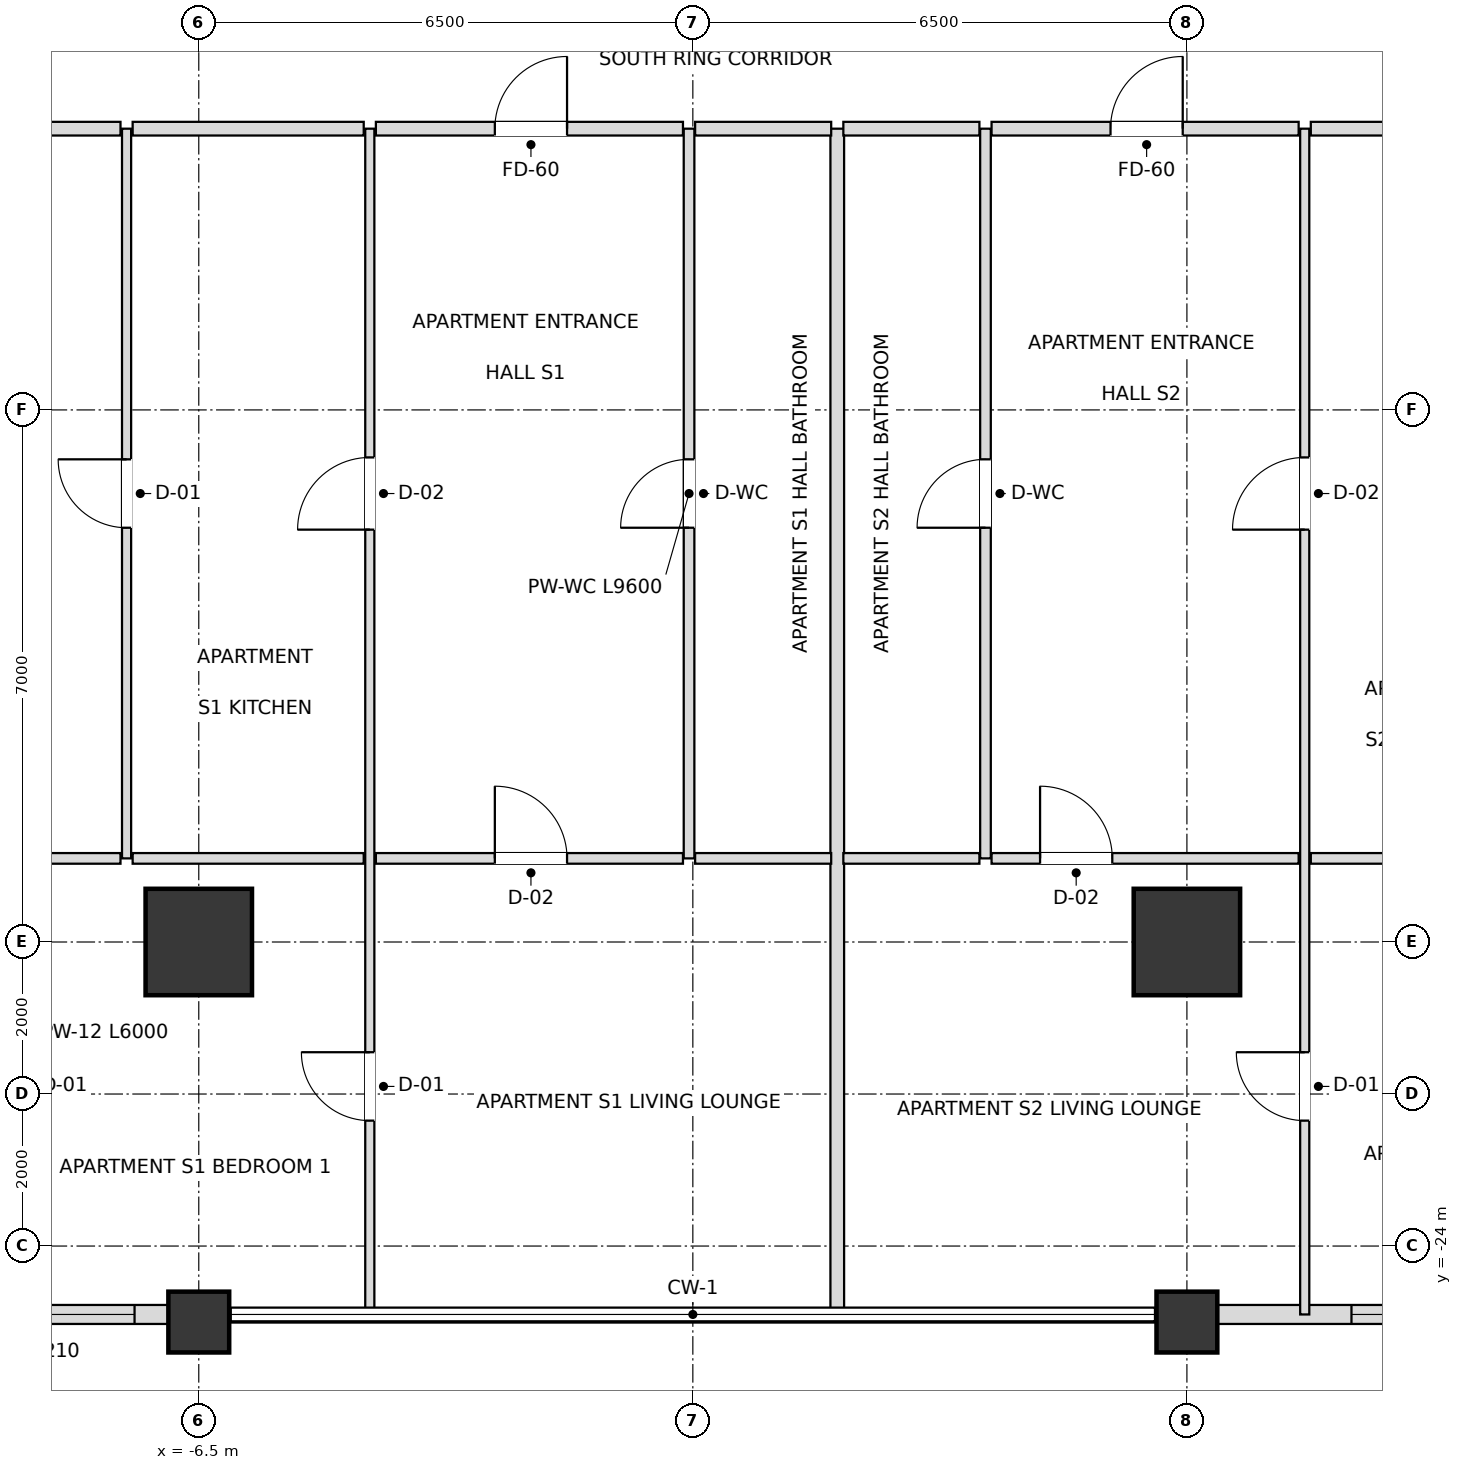
"""IFC4 building model, lengths in metres.
Left out: names, types, materials, properties, quantities, classifications, styles, units other than length and angle.
Written with IfcOpenShell. Run it as: python <this file> out.ifc"""

import sys

from ifc_helpers import new_model, si_unit, direction, frame, frame_2d, origin, origin_2d, place, context, subcontext, project, spatial, rectangle, extrude, element, fill, save


model = new_model("IFC4")
c1 = context("Model", 3, precision=1e-05, world=origin(), true_north=direction((0.0, 1.0)))
c2 = subcontext(c1, "Body", "Model", "MODEL_VIEW")
j1 = project(units=[si_unit("LENGTHUNIT", "METRE"), si_unit("PLANEANGLEUNIT", "RADIAN")], contexts=[c1])
p1 = place(None, origin())
s1 = spatial("IfcSite", under=j1, at=p1, CompositionType="ELEMENT")
p2 = place(p1, origin())
s2 = spatial("IfcBuilding", under=s1, at=p2, CompositionType="ELEMENT")
p3 = place(p2, frame((0.0, 0.0, 54.0)))
s3 = spatial("IfcBuildingStorey", under=s2, at=p3, CompositionType="ELEMENT", Elevation=54.0)
for number, where, z_axis, x_axis in (
    (1, (-6.5, -20.0, 0.0), (0.0, 0.0, 1.0), (1.0, 0.0, 0.0)),
    (2, (6.5, -20.0, 0.0), (0.0, 0.0, 1.0), (1.0, 0.0, 0.0)),
):
    element("IfcColumn", number, at=place(p3, frame(where, z_axis=z_axis, x_axis=x_axis)), inside=s3, PredefinedType="USERDEFINED", context=c2, shape_type="SweptSolid", body=[
        extrude(rectangle(XDim=1.4, YDim=1.4, at=origin_2d()), origin(), (0.0, 0.0, 1.0), 3.6),
    ])
for number, where, z_axis, x_axis in (
    (3, (-6.5, -25.0, 0.0), (0.0, 0.0, 1.0), (1.0, 0.0, 0.0)),
    (4, (6.5, -25.0, 0.0), (0.0, 0.0, 1.0), (1.0, 0.0, 0.0)),
):
    element("IfcColumn", number, at=place(p3, frame(where, z_axis=z_axis, x_axis=x_axis)), inside=s3, PredefinedType="COLUMN", context=c2, shape_type="SweptSolid", body=[
        extrude(rectangle(XDim=0.8, YDim=0.8, at=origin_2d()), origin(), (0.0, 0.0, 1.0), 3.6),
    ])
p4 = place(p3, frame((-11.105, -24.9, 0.0), z_axis=(0.0, 0.0, 1.0), x_axis=(1.0, 0.0, 0.0)))
e5 = element("IfcWall", 5, at=p4, inside=s3, PredefinedType="SOLIDWALL", context=c2, shape_type="SweptSolid", body=[
    extrude(rectangle(XDim=4.21, YDim=0.25, at=frame_2d((2.105, 0.0))), origin(), (0.0, 0.0, 1.0), 2.736),
])
p5 = place(p4, frame((0.5, 0.0, 0.72)))
e6 = element("IfcOpeningElement", 6, at=p5, cuts=e5, PredefinedType="OPENING", context=c2, shape_type="SweptSolid", body=[
    extrude(rectangle(XDim=1.2, YDim=1.68, at=frame_2d((0.6, 0.84))), frame((0.0, 0.135, 0.0), z_axis=(0.0, -1.0, 0.0), x_axis=(1.0, 0.0, 0.0)), (0.0, 0.0, 1.0), 0.27),
])
p6 = place(p4, frame((2.56, 0.0, 0.72)))
e7 = element("IfcOpeningElement", 7, at=p6, cuts=e5, PredefinedType="OPENING", context=c2, shape_type="SweptSolid", body=[
    extrude(rectangle(XDim=1.2, YDim=1.68, at=frame_2d((0.6, 0.84))), frame((0.0, 0.135, 0.0), z_axis=(0.0, -1.0, 0.0), x_axis=(1.0, 0.0, 0.0)), (0.0, 0.0, 1.0), 0.27),
])
p7 = place(p3, frame((6.895, -24.9, 0.0), z_axis=(0.0, 0.0, 1.0), x_axis=(1.0, 0.0, 0.0)))
e8 = element("IfcWall", 8, at=p7, inside=s3, PredefinedType="SOLIDWALL", context=c2, shape_type="SweptSolid", body=[
    extrude(rectangle(XDim=4.21, YDim=0.25, at=frame_2d((2.105, 0.0))), origin(), (0.0, 0.0, 1.0), 2.736),
])
p8 = place(p7, frame((1.77, 0.0, 0.72)))
e9 = element("IfcOpeningElement", 9, at=p8, cuts=e8, PredefinedType="OPENING", context=c2, shape_type="SweptSolid", body=[
    extrude(rectangle(XDim=1.8, YDim=1.68, at=frame_2d((0.9, 0.84))), frame((0.0, 0.135, 0.0), z_axis=(0.0, -1.0, 0.0), x_axis=(1.0, 0.0, 0.0)), (0.0, 0.0, 1.0), 0.27),
])
p9 = place(p3, frame((-7.45, -18.9, 0.0), z_axis=(0.0, 0.0, 1.0), x_axis=(0.0, 1.0, 0.0)))
e10 = element("IfcWall", 10, at=p9, inside=s3, PredefinedType="PARTITIONING", context=c2, shape_type="SweptSolid", body=[
    extrude(rectangle(XDim=9.6, YDim=0.12, at=frame_2d((4.8, 0.0))), origin(), (0.0, 0.0, 1.0), 2.816),
])
p10 = place(p9, frame((4.35, 0.0, 0.0)))
e11 = element("IfcOpeningElement", 11, at=p10, cuts=e10, PredefinedType="OPENING", context=c2, shape_type="SweptSolid", body=[
    extrude(rectangle(XDim=0.9, YDim=2.1, at=frame_2d((0.45, 1.05))), frame((0.0, 0.07, 0.0), z_axis=(0.0, -1.0, 0.0), x_axis=(1.0, 0.0, 0.0)), (0.0, 0.0, 1.0), 0.14),
])
p11 = place(p3, frame((-4.25, -24.9, 0.0), z_axis=(0.0, 0.0, 1.0), x_axis=(0.0, 1.0, 0.0)))
e12 = element("IfcWall", 12, at=p11, inside=s3, PredefinedType="PARTITIONING", context=c2, shape_type="SweptSolid", body=[
    extrude(rectangle(XDim=15.6, YDim=0.12, at=frame_2d((7.8, 0.0))), origin(), (0.0, 0.0, 1.0), 2.816),
])
p12 = place(p11, frame((10.325, 0.0, 0.0)))
e13 = element("IfcOpeningElement", 13, at=p12, cuts=e12, PredefinedType="OPENING", context=c2, shape_type="SweptSolid", body=[
    extrude(rectangle(XDim=0.95, YDim=2.1, at=frame_2d((0.475, 1.05))), frame((0.0, 0.07, 0.0), z_axis=(0.0, -1.0, 0.0), x_axis=(1.0, 0.0, 0.0)), (0.0, 0.0, 1.0), 0.14),
])
p13 = place(p11, frame((2.55, 0.0, 0.0)))
e14 = element("IfcOpeningElement", 14, at=p13, cuts=e12, PredefinedType="OPENING", context=c2, shape_type="SweptSolid", body=[
    extrude(rectangle(XDim=0.9, YDim=2.1, at=frame_2d((0.45, 1.05))), frame((0.0, 0.07, 0.0), z_axis=(0.0, -1.0, 0.0), x_axis=(1.0, 0.0, 0.0)), (0.0, 0.0, 1.0), 0.14),
])
p14 = place(p3, frame((-0.05, -18.9, 0.0), z_axis=(0.0, 0.0, 1.0), x_axis=(0.0, 1.0, 0.0)))
e15 = element("IfcWall", 15, at=p14, inside=s3, PredefinedType="PARTITIONING", context=c2, shape_type="SweptSolid", body=[
    extrude(rectangle(XDim=9.6, YDim=0.14, at=frame_2d((4.8, 0.0))), origin(), (0.0, 0.0, 1.0), 2.948),
])
p15 = place(p14, frame((4.35, 0.0, 0.0)))
e16 = element("IfcOpeningElement", 16, at=p15, cuts=e15, PredefinedType="OPENING", context=c2, shape_type="SweptSolid", body=[
    extrude(rectangle(XDim=0.9, YDim=2.1, at=frame_2d((0.45, 1.05))), frame((0.0, 0.08, 0.0), z_axis=(0.0, -1.0, 0.0), x_axis=(1.0, 0.0, 0.0)), (0.0, 0.0, 1.0), 0.16),
])
p16 = place(p3, frame((1.9, -24.9, 0.0), z_axis=(0.0, 0.0, 1.0), x_axis=(0.0, 1.0, 0.0)))
e17 = element("IfcWall", 17, at=p16, inside=s3, PredefinedType="PARTITIONING", context=c2, shape_type="SweptSolid", body=[
    extrude(rectangle(XDim=15.6, YDim=0.18, at=frame_2d((7.8, 0.0))), origin(), (0.0, 0.0, 1.0), 2.816),
])
p17 = place(p3, frame((3.85, -18.9, 0.0), z_axis=(0.0, 0.0, 1.0), x_axis=(0.0, 1.0, 0.0)))
e18 = element("IfcWall", 18, at=p17, inside=s3, PredefinedType="PARTITIONING", context=c2, shape_type="SweptSolid", body=[
    extrude(rectangle(XDim=9.6, YDim=0.14, at=frame_2d((4.8, 0.0))), origin(), (0.0, 0.0, 1.0), 2.948),
])
p18 = place(p17, frame((4.35, 0.0, 0.0)))
e19 = element("IfcOpeningElement", 19, at=p18, cuts=e18, PredefinedType="OPENING", context=c2, shape_type="SweptSolid", body=[
    extrude(rectangle(XDim=0.9, YDim=2.1, at=frame_2d((0.45, 1.05))), frame((0.0, 0.08, 0.0), z_axis=(0.0, -1.0, 0.0), x_axis=(1.0, 0.0, 0.0)), (0.0, 0.0, 1.0), 0.16),
])
p19 = place(p3, frame((8.05, -24.9, 0.0), z_axis=(0.0, 0.0, 1.0), x_axis=(0.0, 1.0, 0.0)))
e20 = element("IfcWall", 20, at=p19, inside=s3, PredefinedType="PARTITIONING", context=c2, shape_type="SweptSolid", body=[
    extrude(rectangle(XDim=15.6, YDim=0.12, at=frame_2d((7.8, 0.0))), origin(), (0.0, 0.0, 1.0), 2.816),
])
p20 = place(p19, frame((10.325, 0.0, 0.0)))
e21 = element("IfcOpeningElement", 21, at=p20, cuts=e20, PredefinedType="OPENING", context=c2, shape_type="SweptSolid", body=[
    extrude(rectangle(XDim=0.95, YDim=2.1, at=frame_2d((0.475, 1.05))), frame((0.0, 0.07, 0.0), z_axis=(0.0, -1.0, 0.0), x_axis=(1.0, 0.0, 0.0)), (0.0, 0.0, 1.0), 0.14),
])
p21 = place(p19, frame((2.55, 0.0, 0.0)))
e22 = element("IfcOpeningElement", 22, at=p21, cuts=e20, PredefinedType="OPENING", context=c2, shape_type="SweptSolid", body=[
    extrude(rectangle(XDim=0.9, YDim=2.1, at=frame_2d((0.45, 1.05))), frame((0.0, 0.07, 0.0), z_axis=(0.0, -1.0, 0.0), x_axis=(1.0, 0.0, 0.0)), (0.0, 0.0, 1.0), 0.14),
])
p22 = place(p3, frame((-8.87, -18.9, 0.0), z_axis=(0.0, 0.0, 1.0), x_axis=(1.0, 0.0, 0.0)))
e23 = element("IfcWall", 23, at=p22, inside=s3, PredefinedType="PARTITIONING", context=c2, shape_type="SweptSolid", body=[
    extrude(rectangle(XDim=1.34, YDim=0.14, at=frame_2d((0.67, 0.0))), origin(), (0.0, 0.0, 1.0), 3.38),
])
p23 = place(p3, frame((-7.37, -18.9, 0.0), z_axis=(0.0, 0.0, 1.0), x_axis=(1.0, 0.0, 0.0)))
e24 = element("IfcWall", 24, at=p23, inside=s3, PredefinedType="PARTITIONING", context=c2, shape_type="SweptSolid", body=[
    extrude(rectangle(XDim=3.04, YDim=0.14, at=frame_2d((1.52, 0.0))), origin(), (0.0, 0.0, 1.0), 2.816),
])
p24 = place(p3, frame((-4.17, -18.9, 0.0), z_axis=(0.0, 0.0, 1.0), x_axis=(1.0, 0.0, 0.0)))
e25 = element("IfcWall", 25, at=p24, inside=s3, PredefinedType="PARTITIONING", context=c2, shape_type="SweptSolid", body=[
    extrude(rectangle(XDim=4.04, YDim=0.14, at=frame_2d((2.02, 0.0))), origin(), (0.0, 0.0, 1.0), 3.38),
])
p25 = place(p24, frame((1.565, 0.0, 0.0)))
e26 = element("IfcOpeningElement", 26, at=p25, cuts=e25, PredefinedType="OPENING", context=c2, shape_type="SweptSolid", body=[
    extrude(rectangle(XDim=0.95, YDim=2.1, at=frame_2d((0.475, 1.05))), frame((0.0, 0.08, 0.0), z_axis=(0.0, -1.0, 0.0), x_axis=(1.0, 0.0, 0.0)), (0.0, 0.0, 1.0), 0.16),
])
for number, where, z_axis, x_axis in (
    (27, (0.03, -18.9, 0.0), (0.0, 0.0, 1.0), (1.0, 0.0, 0.0)),
    (28, (1.98, -18.9, 0.0), (0.0, 0.0, 1.0), (1.0, 0.0, 0.0)),
):
    element("IfcWall", number, at=place(p3, frame(where, z_axis=z_axis, x_axis=x_axis)), inside=s3, PredefinedType="PARTITIONING", context=c2, shape_type="SweptSolid", body=[
        extrude(rectangle(XDim=1.79, YDim=0.14, at=frame_2d((0.895, 0.0))), origin(), (0.0, 0.0, 1.0), 3.38),
    ])
p26 = place(p3, frame((3.93, -18.9, 0.0), z_axis=(0.0, 0.0, 1.0), x_axis=(1.0, 0.0, 0.0)))
e29 = element("IfcWall", 29, at=p26, inside=s3, PredefinedType="PARTITIONING", context=c2, shape_type="SweptSolid", body=[
    extrude(rectangle(XDim=4.04, YDim=0.14, at=frame_2d((2.02, 0.0))), origin(), (0.0, 0.0, 1.0), 2.816),
])
p27 = place(p26, frame((0.638, 0.0, 0.0)))
e30 = element("IfcOpeningElement", 30, at=p27, cuts=e29, PredefinedType="OPENING", context=c2, shape_type="SweptSolid", body=[
    extrude(rectangle(XDim=0.95, YDim=2.1, at=frame_2d((0.475, 1.05))), frame((0.0, 0.08, 0.0), z_axis=(0.0, -1.0, 0.0), x_axis=(1.0, 0.0, 0.0)), (0.0, 0.0, 1.0), 0.16),
])
p28 = place(p3, frame((8.13, -18.9, 0.0), z_axis=(0.0, 0.0, 1.0), x_axis=(1.0, 0.0, 0.0)))
e31 = element("IfcWall", 31, at=p28, inside=s3, PredefinedType="PARTITIONING", context=c2, shape_type="SweptSolid", body=[
    extrude(rectangle(XDim=3.04, YDim=0.14, at=frame_2d((1.52, 0.0))), origin(), (0.0, 0.0, 1.0), 3.38),
])
p29 = place(p3, frame((-18.32, -9.3, 0.0), z_axis=(0.0, 0.0, 1.0), x_axis=(1.0, 0.0, 0.0)))
e32 = element("IfcWall", 32, at=p29, inside=s3, PredefinedType="PARTITIONING", context=c2, shape_type="SweptSolid", body=[
    extrude(rectangle(XDim=10.79, YDim=0.18, at=frame_2d((5.395, 0.0))), origin(), (0.0, 0.0, 1.0), 2.816),
])
p30 = place(p3, frame((-7.37, -9.3, 0.0), z_axis=(0.0, 0.0, 1.0), x_axis=(1.0, 0.0, 0.0)))
e33 = element("IfcWall", 33, at=p30, inside=s3, PredefinedType="PARTITIONING", context=c2, shape_type="SweptSolid", body=[
    extrude(rectangle(XDim=3.04, YDim=0.18, at=frame_2d((1.52, 0.0))), origin(), (0.0, 0.0, 1.0), 2.816),
])
p31 = place(p3, frame((-4.17, -9.3, 0.0), z_axis=(0.0, 0.0, 1.0), x_axis=(1.0, 0.0, 0.0)))
e34 = element("IfcWall", 34, at=p31, inside=s3, PredefinedType="PARTITIONING", context=c2, shape_type="SweptSolid", body=[
    extrude(rectangle(XDim=4.04, YDim=0.18, at=frame_2d((2.02, 0.0))), origin(), (0.0, 0.0, 1.0), 3.38),
])
p32 = place(p31, frame((1.565, 0.0, 0.0)))
e35 = element("IfcOpeningElement", 35, at=p32, cuts=e34, PredefinedType="OPENING", context=c2, shape_type="SweptSolid", body=[
    extrude(rectangle(XDim=0.95, YDim=2.15, at=frame_2d((0.475, 1.075))), frame((0.0, 0.1, 0.0), z_axis=(0.0, -1.0, 0.0), x_axis=(1.0, 0.0, 0.0)), (0.0, 0.0, 1.0), 0.2),
])
for number, where, z_axis, x_axis in (
    (36, (0.03, -9.3, 0.0), (0.0, 0.0, 1.0), (1.0, 0.0, 0.0)),
    (37, (1.98, -9.3, 0.0), (0.0, 0.0, 1.0), (1.0, 0.0, 0.0)),
):
    element("IfcWall", number, at=place(p3, frame(where, z_axis=z_axis, x_axis=x_axis)), inside=s3, PredefinedType="PARTITIONING", context=c2, shape_type="SweptSolid", body=[
        extrude(rectangle(XDim=1.79, YDim=0.18, at=frame_2d((0.895, 0.0))), origin(), (0.0, 0.0, 1.0), 3.38),
    ])
p33 = place(p3, frame((3.93, -9.3, 0.0), z_axis=(0.0, 0.0, 1.0), x_axis=(1.0, 0.0, 0.0)))
e38 = element("IfcWall", 38, at=p33, inside=s3, PredefinedType="PARTITIONING", context=c2, shape_type="SweptSolid", body=[
    extrude(rectangle(XDim=4.04, YDim=0.18, at=frame_2d((2.02, 0.0))), origin(), (0.0, 0.0, 1.0), 2.816),
])
p34 = place(p33, frame((1.565, 0.0, 0.0)))
e39 = element("IfcOpeningElement", 39, at=p34, cuts=e38, PredefinedType="OPENING", context=c2, shape_type="SweptSolid", body=[
    extrude(rectangle(XDim=0.95, YDim=2.15, at=frame_2d((0.475, 1.075))), frame((0.0, 0.1, 0.0), z_axis=(0.0, -1.0, 0.0), x_axis=(1.0, 0.0, 0.0)), (0.0, 0.0, 1.0), 0.2),
])
p35 = place(p3, frame((8.13, -9.3, 0.0), z_axis=(0.0, 0.0, 1.0), x_axis=(1.0, 0.0, 0.0)))
e40 = element("IfcWall", 40, at=p35, inside=s3, PredefinedType="PARTITIONING", context=c2, shape_type="SweptSolid", body=[
    extrude(rectangle(XDim=3.04, YDim=0.18, at=frame_2d((1.52, 0.0))), origin(), (0.0, 0.0, 1.0), 3.38),
])
p36 = place(p6, origin())
e41 = element("IfcWindow", 41, at=p36, inside=s3, PartitioningType="SINGLE_PANEL", PredefinedType="WINDOW", context=c2, shape_type="SweptSolid", body=[
    extrude(rectangle(XDim=1.2, YDim=1.68, at=frame_2d((0.6, 0.84))), frame((0.0, 0.03, 0.0), z_axis=(0.0, -1.0, 0.0), x_axis=(1.0, 0.0, 0.0)), (0.0, 0.0, 1.0), 0.06),
])
fill(e7, e41)
p37 = place(p8, origin())
e42 = element("IfcWindow", 42, at=p37, inside=s3, PartitioningType="SINGLE_PANEL", PredefinedType="WINDOW", context=c2, shape_type="SweptSolid", body=[
    extrude(rectangle(XDim=1.8, YDim=1.68, at=frame_2d((0.9, 0.84))), frame((0.0, 0.03, 0.0), z_axis=(0.0, -1.0, 0.0), x_axis=(1.0, 0.0, 0.0)), (0.0, 0.0, 1.0), 0.06),
])
fill(e9, e42)
p38 = place(p15, origin())
e43 = element("IfcDoor", 43, at=p38, inside=s3, OperationType="SINGLE_SWING_LEFT", PredefinedType="DOOR", context=c2, shape_type="SweptSolid", body=[
    extrude(rectangle(XDim=0.9, YDim=2.1, at=frame_2d((0.45, 1.05))), frame((0.0, 0.025, 0.0), z_axis=(0.0, -1.0, 0.0), x_axis=(1.0, 0.0, 0.0)), (0.0, 0.0, 1.0), 0.05),
])
fill(e16, e43)
p39 = place(p32, origin())
e44 = element("IfcDoor", 44, at=p39, inside=s3, OperationType="SINGLE_SWING_RIGHT", PredefinedType="DOOR", context=c2, shape_type="SweptSolid", body=[
    extrude(rectangle(XDim=0.95, YDim=2.15, at=frame_2d((0.475, 1.075))), frame((0.0, 0.025, 0.0), z_axis=(0.0, -1.0, 0.0), x_axis=(1.0, 0.0, 0.0)), (0.0, 0.0, 1.0), 0.05),
])
fill(e35, e44)
p40 = place(p12, origin())
e45 = element("IfcDoor", 45, at=p40, inside=s3, OperationType="SINGLE_SWING_LEFT", PredefinedType="DOOR", context=c2, shape_type="SweptSolid", body=[
    extrude(rectangle(XDim=0.95, YDim=2.1, at=frame_2d((0.475, 1.05))), frame((0.0, 0.025, 0.0), z_axis=(0.0, -1.0, 0.0), x_axis=(1.0, 0.0, 0.0)), (0.0, 0.0, 1.0), 0.05),
])
fill(e13, e45)
p41 = place(p10, origin())
e46 = element("IfcDoor", 46, at=p41, inside=s3, OperationType="SINGLE_SWING_RIGHT", PredefinedType="DOOR", context=c2, shape_type="SweptSolid", body=[
    extrude(rectangle(XDim=0.9, YDim=2.1, at=frame_2d((0.45, 1.05))), frame((0.0, 0.025, 0.0), z_axis=(0.0, -1.0, 0.0), x_axis=(1.0, 0.0, 0.0)), (0.0, 0.0, 1.0), 0.05),
])
fill(e11, e46)
p42 = place(p25, origin())
e47 = element("IfcDoor", 47, at=p42, inside=s3, OperationType="SINGLE_SWING_LEFT", PredefinedType="DOOR", context=c2, shape_type="SweptSolid", body=[
    extrude(rectangle(XDim=0.95, YDim=2.1, at=frame_2d((0.475, 1.05))), frame((0.0, 0.025, 0.0), z_axis=(0.0, -1.0, 0.0), x_axis=(1.0, 0.0, 0.0)), (0.0, 0.0, 1.0), 0.05),
])
fill(e26, e47)
p43 = place(p13, origin())
e48 = element("IfcDoor", 48, at=p43, inside=s3, OperationType="SINGLE_SWING_RIGHT", PredefinedType="DOOR", context=c2, shape_type="SweptSolid", body=[
    extrude(rectangle(XDim=0.9, YDim=2.1, at=frame_2d((0.45, 1.05))), frame((0.0, 0.025, 0.0), z_axis=(0.0, -1.0, 0.0), x_axis=(1.0, 0.0, 0.0)), (0.0, 0.0, 1.0), 0.05),
])
fill(e14, e48)
p44 = place(p18, origin())
e49 = element("IfcDoor", 49, at=p44, inside=s3, OperationType="SINGLE_SWING_LEFT", PredefinedType="DOOR", context=c2, shape_type="SweptSolid", body=[
    extrude(rectangle(XDim=0.9, YDim=2.1, at=frame_2d((0.45, 1.05))), frame((0.0, 0.025, 0.0), z_axis=(0.0, -1.0, 0.0), x_axis=(1.0, 0.0, 0.0)), (0.0, 0.0, 1.0), 0.05),
])
fill(e19, e49)
p45 = place(p34, origin())
e50 = element("IfcDoor", 50, at=p45, inside=s3, OperationType="SINGLE_SWING_RIGHT", PredefinedType="DOOR", context=c2, shape_type="SweptSolid", body=[
    extrude(rectangle(XDim=0.95, YDim=2.15, at=frame_2d((0.475, 1.075))), frame((0.0, 0.025, 0.0), z_axis=(0.0, -1.0, 0.0), x_axis=(1.0, 0.0, 0.0)), (0.0, 0.0, 1.0), 0.05),
])
fill(e39, e50)
p46 = place(p20, origin())
e51 = element("IfcDoor", 51, at=p46, inside=s3, OperationType="SINGLE_SWING_LEFT", PredefinedType="DOOR", context=c2, shape_type="SweptSolid", body=[
    extrude(rectangle(XDim=0.95, YDim=2.1, at=frame_2d((0.475, 1.05))), frame((0.0, 0.025, 0.0), z_axis=(0.0, -1.0, 0.0), x_axis=(1.0, 0.0, 0.0)), (0.0, 0.0, 1.0), 0.05),
])
fill(e21, e51)
p47 = place(p27, origin())
e52 = element("IfcDoor", 52, at=p47, inside=s3, OperationType="SINGLE_SWING_LEFT", PredefinedType="DOOR", context=c2, shape_type="SweptSolid", body=[
    extrude(rectangle(XDim=0.95, YDim=2.1, at=frame_2d((0.475, 1.05))), frame((0.0, 0.025, 0.0), z_axis=(0.0, -1.0, 0.0), x_axis=(1.0, 0.0, 0.0)), (0.0, 0.0, 1.0), 0.05),
])
fill(e30, e52)
p48 = place(p21, origin())
e53 = element("IfcDoor", 53, at=p48, inside=s3, OperationType="SINGLE_SWING_RIGHT", PredefinedType="DOOR", context=c2, shape_type="SweptSolid", body=[
    extrude(rectangle(XDim=0.9, YDim=2.1, at=frame_2d((0.45, 1.05))), frame((0.0, 0.025, 0.0), z_axis=(0.0, -1.0, 0.0), x_axis=(1.0, 0.0, 0.0)), (0.0, 0.0, 1.0), 0.05),
])
fill(e22, e53)
save(model, sys.argv[1])
